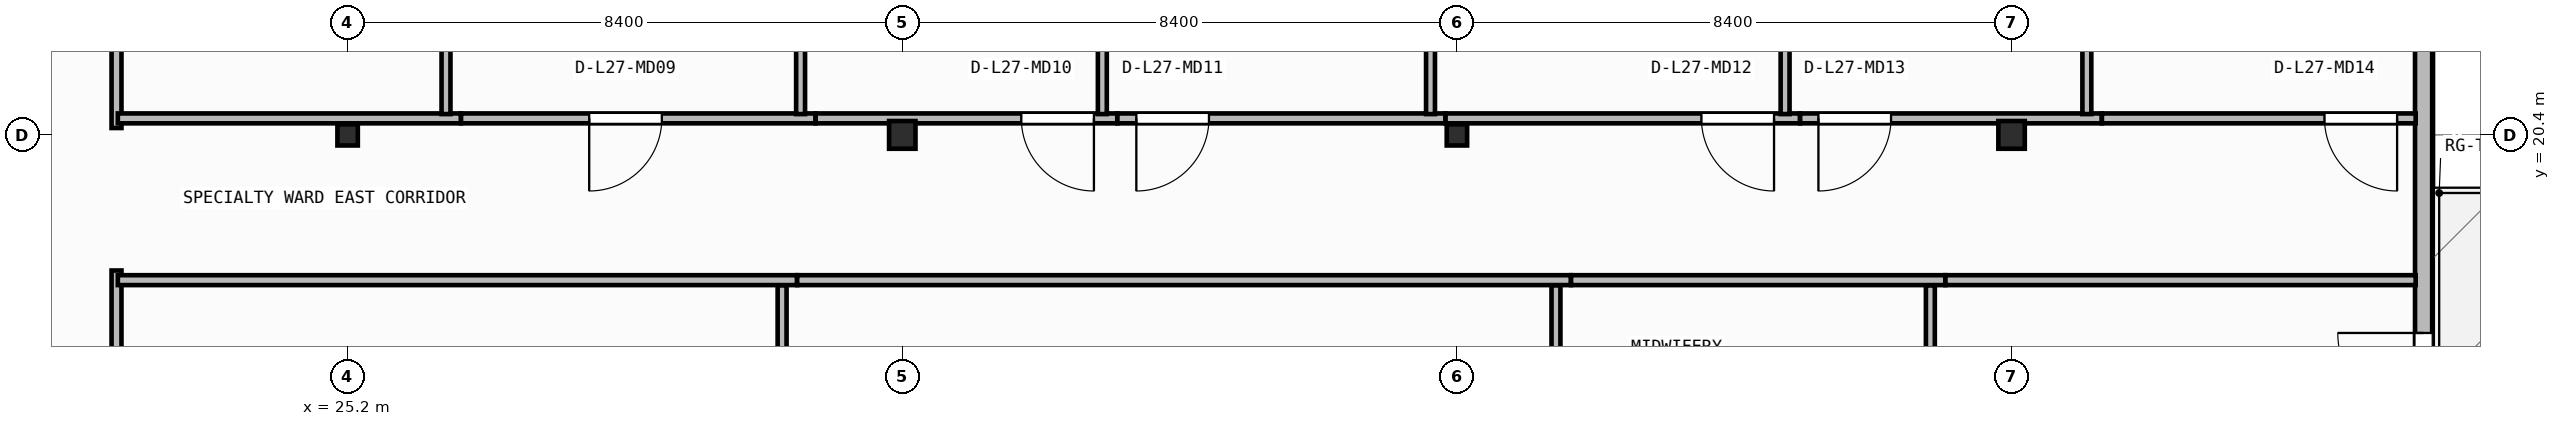
"""IFC4 building model, lengths in metres.
Left out: names, types, materials, properties, quantities, classifications, styles, units other than length and angle.
Written with IfcOpenShell. Run it as: python <this file> out.ifc"""

import sys

from ifc_helpers import new_model, si_unit, direction, frame, frame_2d, origin, origin_2d, place, context, subcontext, project, spatial, rectangle, i_section, extrude, element, fill, save


model = new_model("IFC4")
c1 = context("Model", 3, precision=1e-05, world=origin(), true_north=direction((0.0, 1.0)))
c2 = subcontext(c1, "Body", "Model", "MODEL_VIEW")
j1 = project(units=[si_unit("LENGTHUNIT", "METRE"), si_unit("PLANEANGLEUNIT", "RADIAN")], contexts=[c1])
p1 = place(None, origin())
s1 = spatial("IfcSite", under=j1, at=p1, CompositionType="ELEMENT")
p2 = place(p1, origin())
s2 = spatial("IfcBuilding", under=s1, at=p2, CompositionType="ELEMENT")
p3 = place(p2, frame((0.0, 0.0, 111.25)))
s3 = spatial("IfcBuildingStorey", under=s2, at=p3, CompositionType="ELEMENT", Elevation=111.25)
p4 = place(p3, frame((25.2, 20.4, 0.0), z_axis=(0.0, 0.0, 1.0), x_axis=(1.0, 0.0, 0.0)))
e1 = element("IfcColumn", 1, at=p4, inside=s3, PredefinedType="COLUMN", context=c2, shape_type="SweptSolid", body=[
    extrude(i_section(OverallWidth=0.309, OverallDepth=0.321, WebThickness=0.014, FlangeThickness=0.022, FilletRadius=0.017, at=origin_2d()), origin(), (0.0, 0.0, 1.0), 3.95),
])
p5 = place(p3, frame((33.6, 20.4, 0.0), z_axis=(0.0, 0.0, 1.0), x_axis=(1.0, 0.0, 0.0)))
e2 = element("IfcColumn", 2, at=p5, inside=s3, PredefinedType="COLUMN", context=c2, shape_type="SweptSolid", body=[
    extrude(i_section(OverallWidth=0.4, OverallDepth=0.42, WebThickness=0.025, FlangeThickness=0.04, at=origin_2d()), origin(), (0.0, 0.0, 1.0), 3.95),
])
p6 = place(p3, frame((42.0, 20.4, 0.0), z_axis=(0.0, 0.0, 1.0), x_axis=(1.0, 0.0, 0.0)))
e3 = element("IfcColumn", 3, at=p6, inside=s3, PredefinedType="COLUMN", context=c2, shape_type="SweptSolid", body=[
    extrude(i_section(OverallWidth=0.309, OverallDepth=0.321, WebThickness=0.014, FlangeThickness=0.022, FilletRadius=0.017, at=origin_2d()), origin(), (0.0, 0.0, 1.0), 3.95),
])
p7 = place(p3, frame((50.4, 20.4, 0.0), z_axis=(0.0, 0.0, 1.0), x_axis=(1.0, 0.0, 0.0)))
e4 = element("IfcColumn", 4, at=p7, inside=s3, PredefinedType="COLUMN", context=c2, shape_type="SweptSolid", body=[
    extrude(i_section(OverallWidth=0.4, OverallDepth=0.42, WebThickness=0.025, FlangeThickness=0.04, at=origin_2d()), origin(), (0.0, 0.0, 1.0), 3.95),
])
p8 = place(p3, frame((56.64, 6.86, 0.0), z_axis=(0.0, 0.0, 1.0), x_axis=(0.0, 1.0, 0.0)))
e5 = element("IfcWall", 5, at=p8, inside=s3, PredefinedType="STANDARD", context=c2, shape_type="SweptSolid", body=[
    extrude(rectangle(XDim=23.48, YDim=0.26, at=frame_2d((11.74, 0.0))), origin(), (0.0, 0.0, 1.0), 3.71),
])
p9 = place(p8, frame((9.24, 0.0, 0.0)))
e6 = element("IfcOpeningElement", 6, at=p9, cuts=e5, PredefinedType="OPENING", context=c2, shape_type="SweptSolid", body=[
    extrude(rectangle(XDim=1.3, YDim=2.15, at=frame_2d((0.65, 1.075))), frame((0.0, 0.14, 0.0), z_axis=(0.0, -1.0, 0.0), x_axis=(1.0, 0.0, 0.0)), (0.0, 0.0, 1.0), 0.28),
])
p10 = place(p3, frame((21.7, 14.7, 0.0), z_axis=(0.0, 0.0, 1.0), x_axis=(0.0, 1.0, 0.0)))
e7 = element("IfcWall", 7, at=p10, inside=s3, PredefinedType="PARTITIONING", context=c2, shape_type="SweptSolid", body=[
    extrude(rectangle(XDim=3.646, YDim=0.15, at=frame_2d((1.823, 0.0))), origin(), (0.0, 0.0, 1.0), 3.71),
])
p11 = place(p3, frame((21.7, 20.504, 0.0), z_axis=(0.0, 0.0, 1.0), x_axis=(0.0, 1.0, 0.0)))
e8 = element("IfcWall", 8, at=p11, inside=s3, PredefinedType="PARTITIONING", context=c2, shape_type="SweptSolid", body=[
    extrude(rectangle(XDim=6.756, YDim=0.15, at=frame_2d((3.378, 0.0))), origin(), (0.0, 0.0, 1.0), 3.71),
])
p12 = place(p11, frame((2.828, 0.0, 0.0)))
e9 = element("IfcOpeningElement", 9, at=p12, cuts=e8, PredefinedType="OPENING", context=c2, shape_type="SweptSolid", body=[
    extrude(rectangle(XDim=1.1, YDim=2.1, at=frame_2d((0.55, 1.05))), frame((0.0, 0.085, 0.0), z_axis=(0.0, -1.0, 0.0), x_axis=(1.0, 0.0, 0.0)), (0.0, 0.0, 1.0), 0.17),
])
p13 = place(p3, frame((21.72, 18.2, 0.0), z_axis=(0.0, 0.0, 1.0), x_axis=(1.0, 0.0, 0.0)))
e10 = element("IfcWall", 10, at=p13, inside=s3, PredefinedType="PARTITIONING", context=c2, shape_type="SweptSolid", body=[
    extrude(rectangle(XDim=10.286, YDim=0.15, at=frame_2d((5.143, 0.0))), origin(), (0.0, 0.0, 1.0), 3.71),
])
p14 = place(p3, frame((32.008, 18.2, 0.0), z_axis=(0.0, 0.0, 1.0), x_axis=(1.0, 0.0, 0.0)))
e11 = element("IfcWall", 11, at=p14, inside=s3, PredefinedType="PARTITIONING", context=c2, shape_type="SweptSolid", body=[
    extrude(rectangle(XDim=11.718, YDim=0.15, at=frame_2d((5.859, 0.0))), origin(), (0.0, 0.0, 1.0), 3.71),
])
p15 = place(p3, frame((43.728, 18.2, 0.0), z_axis=(0.0, 0.0, 1.0), x_axis=(1.0, 0.0, 0.0)))
e12 = element("IfcWall", 12, at=p15, inside=s3, PredefinedType="PARTITIONING", context=c2, shape_type="SweptSolid", body=[
    extrude(rectangle(XDim=5.668, YDim=0.15, at=frame_2d((2.834, 0.0))), origin(), (0.0, 0.0, 1.0), 3.71),
])
p16 = place(p3, frame((49.398, 18.2, 0.0), z_axis=(0.0, 0.0, 1.0), x_axis=(1.0, 0.0, 0.0)))
e13 = element("IfcWall", 13, at=p16, inside=s3, PredefinedType="PARTITIONING", context=c2, shape_type="SweptSolid", body=[
    extrude(rectangle(XDim=7.122, YDim=0.15, at=frame_2d((3.561, 0.0))), origin(), (0.0, 0.0, 1.0), 3.71),
])
p17 = place(p3, frame((26.916, 20.65, 0.0), z_axis=(0.0, 0.0, 1.0), x_axis=(-1.0, 0.0, 0.0)))
e14 = element("IfcWall", 14, at=p17, inside=s3, PredefinedType="PARTITIONING", context=c2, shape_type="SweptSolid", body=[
    extrude(rectangle(XDim=5.196, YDim=0.15, at=frame_2d((2.598, 0.0))), origin(), (0.0, 0.0, 1.0), 3.083),
])
p18 = place(p3, frame((32.286, 20.65, 0.0), z_axis=(0.0, 0.0, 1.0), x_axis=(-1.0, 0.0, 0.0)))
e15 = element("IfcWall", 15, at=p18, inside=s3, PredefinedType="PARTITIONING", context=c2, shape_type="SweptSolid", body=[
    extrude(rectangle(XDim=5.368, YDim=0.15, at=frame_2d((2.684, 0.0))), origin(), (0.0, 0.0, 1.0), 3.083),
])
p19 = place(p18, frame((2.327, 0.0, 0.0)))
e16 = element("IfcOpeningElement", 16, at=p19, cuts=e15, PredefinedType="OPENING", context=c2, shape_type="SweptSolid", body=[
    extrude(rectangle(XDim=1.1, YDim=2.1, at=frame_2d((0.55, 1.05))), frame((0.0, 0.085, 0.0), z_axis=(0.0, -1.0, 0.0), x_axis=(1.0, 0.0, 0.0)), (0.0, 0.0, 1.0), 0.17),
])
p20 = place(p3, frame((36.856, 20.65, 0.0), z_axis=(0.0, 0.0, 1.0), x_axis=(-1.0, 0.0, 0.0)))
e17 = element("IfcWall", 17, at=p20, inside=s3, PredefinedType="PARTITIONING", context=c2, shape_type="SweptSolid", body=[
    extrude(rectangle(XDim=4.568, YDim=0.15, at=frame_2d((2.284, 0.0))), origin(), (0.0, 0.0, 1.0), 3.083),
])
p21 = place(p20, frame((0.354, 0.0, 0.0)))
e18 = element("IfcOpeningElement", 18, at=p21, cuts=e17, PredefinedType="OPENING", context=c2, shape_type="SweptSolid", body=[
    extrude(rectangle(XDim=1.1, YDim=2.1, at=frame_2d((0.55, 1.05))), frame((0.0, 0.085, 0.0), z_axis=(0.0, -1.0, 0.0), x_axis=(1.0, 0.0, 0.0)), (0.0, 0.0, 1.0), 0.17),
])
p22 = place(p3, frame((41.826, 20.65, 0.0), z_axis=(0.0, 0.0, 1.0), x_axis=(-1.0, 0.0, 0.0)))
e19 = element("IfcWall", 19, at=p22, inside=s3, PredefinedType="PARTITIONING", context=c2, shape_type="SweptSolid", body=[
    extrude(rectangle(XDim=4.968, YDim=0.15, at=frame_2d((2.484, 0.0))), origin(), (0.0, 0.0, 1.0), 3.083),
])
p23 = place(p22, frame((3.581, 0.0, 0.0)))
e20 = element("IfcOpeningElement", 20, at=p23, cuts=e19, PredefinedType="OPENING", context=c2, shape_type="SweptSolid", body=[
    extrude(rectangle(XDim=1.1, YDim=2.1, at=frame_2d((0.55, 1.05))), frame((0.0, 0.085, 0.0), z_axis=(0.0, -1.0, 0.0), x_axis=(1.0, 0.0, 0.0)), (0.0, 0.0, 1.0), 0.17),
])
p24 = place(p3, frame((47.196, 20.65, 0.0), z_axis=(0.0, 0.0, 1.0), x_axis=(-1.0, 0.0, 0.0)))
e21 = element("IfcWall", 21, at=p24, inside=s3, PredefinedType="PARTITIONING", context=c2, shape_type="SweptSolid", body=[
    extrude(rectangle(XDim=5.368, YDim=0.15, at=frame_2d((2.684, 0.0))), origin(), (0.0, 0.0, 1.0), 3.083),
])
p25 = place(p24, frame((0.393, 0.0, 0.0)))
e22 = element("IfcOpeningElement", 22, at=p25, cuts=e21, PredefinedType="OPENING", context=c2, shape_type="SweptSolid", body=[
    extrude(rectangle(XDim=1.1, YDim=2.1, at=frame_2d((0.55, 1.05))), frame((0.0, 0.085, 0.0), z_axis=(0.0, -1.0, 0.0), x_axis=(1.0, 0.0, 0.0)), (0.0, 0.0, 1.0), 0.17),
])
p26 = place(p3, frame((51.766, 20.65, 0.0), z_axis=(0.0, 0.0, 1.0), x_axis=(-1.0, 0.0, 0.0)))
e23 = element("IfcWall", 23, at=p26, inside=s3, PredefinedType="PARTITIONING", context=c2, shape_type="SweptSolid", body=[
    extrude(rectangle(XDim=4.568, YDim=0.15, at=frame_2d((2.284, 0.0))), origin(), (0.0, 0.0, 1.0), 3.083),
])
p27 = place(p26, frame((3.191, 0.0, 0.0)))
e24 = element("IfcOpeningElement", 24, at=p27, cuts=e23, PredefinedType="OPENING", context=c2, shape_type="SweptSolid", body=[
    extrude(rectangle(XDim=1.1, YDim=2.1, at=frame_2d((0.55, 1.05))), frame((0.0, 0.085, 0.0), z_axis=(0.0, -1.0, 0.0), x_axis=(1.0, 0.0, 0.0)), (0.0, 0.0, 1.0), 0.17),
])
p28 = place(p3, frame((56.52, 20.65, 0.0), z_axis=(0.0, 0.0, 1.0), x_axis=(-1.0, 0.0, 0.0)))
e25 = element("IfcWall", 25, at=p28, inside=s3, PredefinedType="PARTITIONING", context=c2, shape_type="SweptSolid", body=[
    extrude(rectangle(XDim=4.752, YDim=0.15, at=frame_2d((2.376, 0.0))), origin(), (0.0, 0.0, 1.0), 3.71),
])
p29 = place(p28, frame((0.281, 0.0, 0.0)))
e26 = element("IfcOpeningElement", 26, at=p29, cuts=e25, PredefinedType="OPENING", context=c2, shape_type="SweptSolid", body=[
    extrude(rectangle(XDim=1.1, YDim=2.1, at=frame_2d((0.55, 1.05))), frame((0.0, 0.085, 0.0), z_axis=(0.0, -1.0, 0.0), x_axis=(1.0, 0.0, 0.0)), (0.0, 0.0, 1.0), 0.17),
])
for number, where, z_axis, x_axis in (
    (27, (31.78, 14.76, 0.0), (0.0, 0.0, 1.0), (0.0, 1.0, 0.0)),
    (28, (43.5, 14.76, 0.0), (0.0, 0.0, 1.0), (0.0, 1.0, 0.0)),
    (29, (49.17, 14.76, 0.0), (0.0, 0.0, 1.0), (0.0, 1.0, 0.0)),
):
    element("IfcWall", number, at=place(p3, frame(where, z_axis=z_axis, x_axis=x_axis)), inside=s3, PredefinedType="PARTITIONING", context=c2, shape_type="SweptSolid", body=[
        extrude(rectangle(XDim=3.36, YDim=0.135, at=frame_2d((1.68, 0.0))), origin(), (0.0, 0.0, 1.0), 3.71),
    ])
for number, where, z_axis, x_axis in (
    (30, (26.69, 20.715, 0.0), (0.0, 0.0, 1.0), (0.0, 1.0, 0.0)),
    (31, (32.06, 20.715, 0.0), (0.0, 0.0, 1.0), (0.0, 1.0, 0.0)),
    (32, (36.63, 20.715, 0.0), (0.0, 0.0, 1.0), (0.0, 1.0, 0.0)),
):
    element("IfcWall", number, at=place(p3, frame(where, z_axis=z_axis, x_axis=x_axis)), inside=s3, PredefinedType="PARTITIONING", context=c2, shape_type="SweptSolid", body=[
        extrude(rectangle(XDim=6.385, YDim=0.135, at=frame_2d((3.192, 0.0))), origin(), (0.0, 0.0, 1.0), 3.71),
    ])
p30 = place(p3, frame((41.6, 20.715, 0.0), z_axis=(0.0, 0.0, 1.0), x_axis=(0.0, 1.0, 0.0)))
e33 = element("IfcWall", 33, at=p30, inside=s3, PredefinedType="PARTITIONING", context=c2, shape_type="SweptSolid", body=[
    extrude(rectangle(XDim=6.385, YDim=0.135, at=frame_2d((3.192, 0.0))), origin(), (0.0, 0.0, 1.0), 3.152),
])
for number, where, z_axis, x_axis in (
    (34, (46.97, 20.715, 0.0), (0.0, 0.0, 1.0), (0.0, 1.0, 0.0)),
    (35, (51.54, 20.715, 0.0), (0.0, 0.0, 1.0), (0.0, 1.0, 0.0)),
):
    element("IfcWall", number, at=place(p3, frame(where, z_axis=z_axis, x_axis=x_axis)), inside=s3, PredefinedType="PARTITIONING", context=c2, shape_type="SweptSolid", body=[
        extrude(rectangle(XDim=6.385, YDim=0.135, at=frame_2d((3.192, 0.0))), origin(), (0.0, 0.0, 1.0), 3.71),
    ])
p31 = place(p9, origin())
e36 = element("IfcDoor", 36, at=p31, inside=s3, OperationType="SINGLE_SWING_RIGHT", PredefinedType="DOOR", context=c2, shape_type="SweptSolid", body=[
    extrude(rectangle(XDim=1.3, YDim=2.15, at=frame_2d((0.65, 1.075))), frame((0.0, 0.025, 0.0), z_axis=(0.0, -1.0, 0.0), x_axis=(1.0, 0.0, 0.0)), (0.0, 0.0, 1.0), 0.05),
])
fill(e6, e36)
p32 = place(p19, origin())
e37 = element("IfcDoor", 37, at=p32, inside=s3, OperationType="SINGLE_SWING_RIGHT", PredefinedType="DOOR", context=c2, shape_type="SweptSolid", body=[
    extrude(rectangle(XDim=1.1, YDim=2.1, at=frame_2d((0.55, 1.05))), frame((0.0, 0.025, 0.0), z_axis=(0.0, -1.0, 0.0), x_axis=(1.0, 0.0, 0.0)), (0.0, 0.0, 1.0), 0.05),
])
fill(e16, e37)
p33 = place(p21, origin())
e38 = element("IfcDoor", 38, at=p33, inside=s3, OperationType="SINGLE_SWING_LEFT", PredefinedType="DOOR", context=c2, shape_type="SweptSolid", body=[
    extrude(rectangle(XDim=1.1, YDim=2.1, at=frame_2d((0.55, 1.05))), frame((0.0, 0.025, 0.0), z_axis=(0.0, -1.0, 0.0), x_axis=(1.0, 0.0, 0.0)), (0.0, 0.0, 1.0), 0.05),
])
fill(e18, e38)
p34 = place(p23, origin())
e39 = element("IfcDoor", 39, at=p34, inside=s3, OperationType="SINGLE_SWING_RIGHT", PredefinedType="DOOR", context=c2, shape_type="SweptSolid", body=[
    extrude(rectangle(XDim=1.1, YDim=2.1, at=frame_2d((0.55, 1.05))), frame((0.0, 0.025, 0.0), z_axis=(0.0, -1.0, 0.0), x_axis=(1.0, 0.0, 0.0)), (0.0, 0.0, 1.0), 0.05),
])
fill(e20, e39)
p35 = place(p25, origin())
e40 = element("IfcDoor", 40, at=p35, inside=s3, OperationType="SINGLE_SWING_LEFT", PredefinedType="DOOR", context=c2, shape_type="SweptSolid", body=[
    extrude(rectangle(XDim=1.1, YDim=2.1, at=frame_2d((0.55, 1.05))), frame((0.0, 0.025, 0.0), z_axis=(0.0, -1.0, 0.0), x_axis=(1.0, 0.0, 0.0)), (0.0, 0.0, 1.0), 0.05),
])
fill(e22, e40)
p36 = place(p27, origin())
e41 = element("IfcDoor", 41, at=p36, inside=s3, OperationType="SINGLE_SWING_RIGHT", PredefinedType="DOOR", context=c2, shape_type="SweptSolid", body=[
    extrude(rectangle(XDim=1.1, YDim=2.1, at=frame_2d((0.55, 1.05))), frame((0.0, 0.025, 0.0), z_axis=(0.0, -1.0, 0.0), x_axis=(1.0, 0.0, 0.0)), (0.0, 0.0, 1.0), 0.05),
])
fill(e24, e41)
p37 = place(p29, origin())
e42 = element("IfcDoor", 42, at=p37, inside=s3, OperationType="SINGLE_SWING_LEFT", PredefinedType="DOOR", context=c2, shape_type="SweptSolid", body=[
    extrude(rectangle(XDim=1.1, YDim=2.1, at=frame_2d((0.55, 1.05))), frame((0.0, 0.025, 0.0), z_axis=(0.0, -1.0, 0.0), x_axis=(1.0, 0.0, 0.0)), (0.0, 0.0, 1.0), 0.05),
])
fill(e26, e42)
save(model, sys.argv[1])
